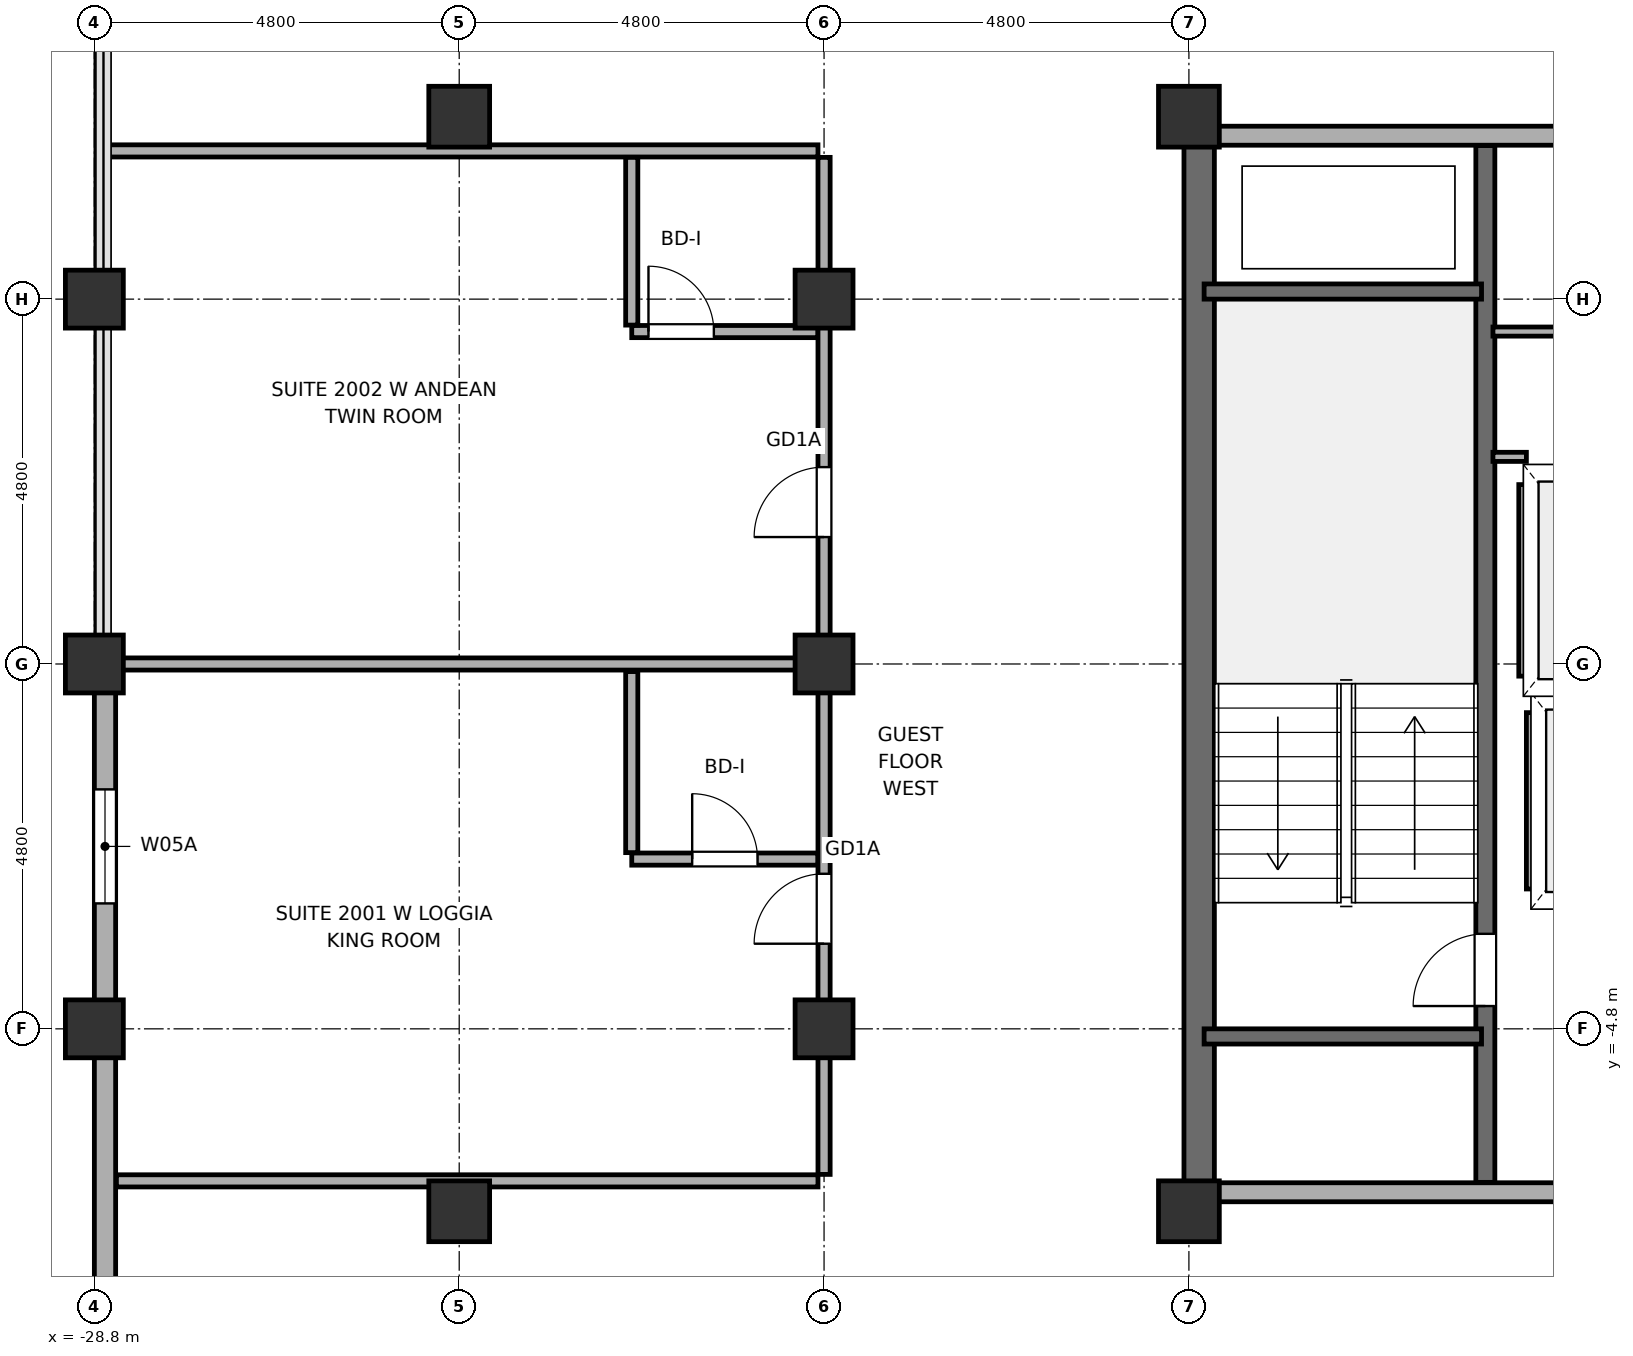
"""IFC4 building model, lengths in metres.
Left out: names, types, materials, properties, quantities, classifications, styles, units other than length and angle.
Written with IfcOpenShell. Run it as: python <this file> out.ifc"""

import sys

from ifc_helpers import new_model, si_unit, direction, frame, frame_2d, origin, origin_2d, place, context, subcontext, project, spatial, rectangle, hollow_rectangle, hollow_circle, extrude, element, fill, save


model = new_model("IFC4")
c1 = context("Model", 3, precision=1e-05, world=origin(), true_north=direction((0.0, 1.0)))
c2 = subcontext(c1, "Body", "Model", "MODEL_VIEW")
j1 = project(units=[si_unit("LENGTHUNIT", "METRE"), si_unit("PLANEANGLEUNIT", "RADIAN")], contexts=[c1])
p1 = place(None, origin())
s1 = spatial("IfcSite", under=j1, at=p1, CompositionType="ELEMENT")
p2 = place(p1, origin())
s2 = spatial("IfcBuilding", under=s1, at=p2, CompositionType="ELEMENT")
p3 = place(p2, frame((0.0, 0.0, 85.5)))
s3 = spatial("IfcBuildingStorey", under=s2, at=p3, CompositionType="ELEMENT", Elevation=85.5)
for number, where, z_axis, x_axis in (
    (1, (-28.8, -4.8, 0.0), (0.0, 0.0, 1.0), (1.0, 0.0, 0.0)),
    (2, (-28.8, 0.0, 0.0), (0.0, 0.0, 1.0), (1.0, 0.0, 0.0)),
    (3, (-28.8, 4.8, 0.0), (0.0, 0.0, 1.0), (1.0, 0.0, 0.0)),
):
    element("IfcColumn", number, at=place(p3, frame(where, z_axis=z_axis, x_axis=x_axis)), inside=s3, PredefinedType="COLUMN", context=c2, shape_type="SweptSolid", body=[
        extrude(hollow_circle(Radius=0.381, WallThickness=0.032, at=origin_2d()), origin(), (0.0, 0.0, 1.0), 3.7),
    ])
for number, where, z_axis, x_axis in (
    (4, (-24.0, -7.2, 0.0), (0.0, 0.0, 1.0), (1.0, 0.0, 0.0)),
    (5, (-24.0, 7.2, 0.0), (0.0, 0.0, 1.0), (1.0, 0.0, 0.0)),
):
    element("IfcColumn", number, at=place(p3, frame(where, z_axis=z_axis, x_axis=x_axis)), inside=s3, PredefinedType="COLUMN", context=c2, shape_type="SweptSolid", body=[
        extrude(hollow_rectangle(XDim=0.8, YDim=0.8, WallThickness=0.036, at=origin_2d()), origin(), (0.0, 0.0, 1.0), 3.7),
    ])
for number, where, z_axis, x_axis in (
    (6, (-19.2, -4.8, 0.0), (0.0, 0.0, 1.0), (1.0, 0.0, 0.0)),
    (7, (-19.2, 0.0, 0.0), (0.0, 0.0, 1.0), (1.0, 0.0, 0.0)),
    (8, (-19.2, 4.8, 0.0), (0.0, 0.0, 1.0), (1.0, 0.0, 0.0)),
):
    element("IfcColumn", number, at=place(p3, frame(where, z_axis=z_axis, x_axis=x_axis)), inside=s3, PredefinedType="COLUMN", context=c2, shape_type="SweptSolid", body=[
        extrude(hollow_circle(Radius=0.381, WallThickness=0.032, at=origin_2d()), origin(), (0.0, 0.0, 1.0), 3.7),
    ])
for number, where, z_axis, x_axis in (
    (9, (-14.4, -7.2, 0.0), (0.0, 0.0, 1.0), (1.0, 0.0, 0.0)),
    (10, (-14.4, 7.2, 0.0), (0.0, 0.0, 1.0), (1.0, 0.0, 0.0)),
):
    element("IfcColumn", number, at=place(p3, frame(where, z_axis=z_axis, x_axis=x_axis)), inside=s3, PredefinedType="COLUMN", context=c2, shape_type="SweptSolid", body=[
        extrude(hollow_rectangle(XDim=0.8, YDim=0.8, WallThickness=0.036, at=origin_2d()), origin(), (0.0, 0.0, 1.0), 3.7),
    ])
p4 = place(p3, frame((-14.265, -7.2, -0.18), z_axis=(0.0, 0.0, 1.0), x_axis=(0.0, 1.0, 0.0)))
e11 = element("IfcWall", 11, at=p4, inside=s3, PredefinedType="SHEAR", context=c2, shape_type="SweptSolid", body=[
    extrude(rectangle(XDim=14.4, YDim=0.4, at=frame_2d((7.2, 0.0))), origin(), (0.0, 0.0, 1.0), 3.63),
])
p5 = place(p3, frame((-28.66, -20.4, 0.0), z_axis=(0.0, 0.0, 1.0), x_axis=(0.0, 1.0, 0.0)))
e12 = element("IfcWall", 12, at=p5, inside=s3, PredefinedType="SOLIDWALL", context=c2, shape_type="SweptSolid", body=[
    extrude(rectangle(XDim=20.38, YDim=0.28, at=frame_2d((10.19, 0.0))), origin(), (0.0, 0.0, 1.0), 2.05),
])
p6 = place(p5, frame((17.25, 0.0, 0.75)))
e13 = element("IfcOpeningElement", 13, at=p6, cuts=e12, PredefinedType="OPENING", context=c2, shape_type="SweptSolid", body=[
    extrude(rectangle(XDim=1.5, YDim=1.15, at=frame_2d((0.75, 0.575))), frame((0.0, 0.155, 0.0), z_axis=(0.0, -1.0, 0.0), x_axis=(1.0, 0.0, 0.0)), (0.0, 0.0, 1.0), 0.31),
])
p7 = place(p3, frame((-14.2, -6.95, 0.0), z_axis=(0.0, 0.0, 1.0), x_axis=(1.0, 0.0, 0.0)))
e14 = element("IfcWall", 14, at=p7, inside=s3, PredefinedType="SOLIDWALL", context=c2, shape_type="SweptSolid", body=[
    extrude(rectangle(XDim=9.4, YDim=0.25, at=frame_2d((4.7, 0.0))), origin(), (0.0, 0.0, 1.0), 2.05),
])
p8 = place(p7, frame((4.9, 0.0, 0.0)))
e15 = element("IfcOpeningElement", 15, at=p8, cuts=e14, PredefinedType="OPENING", context=c2, shape_type="SweptSolid", body=[
    extrude(rectangle(XDim=1.0, YDim=2.02, at=frame_2d((0.5, 1.01))), frame((0.0, 0.14, 0.0), z_axis=(0.0, -1.0, 0.0), x_axis=(1.0, 0.0, 0.0)), (0.0, 0.0, 1.0), 0.28),
])
p9 = place(p3, frame((-14.2, 6.95, 0.0), z_axis=(0.0, 0.0, 1.0), x_axis=(1.0, 0.0, 0.0)))
e16 = element("IfcWall", 16, at=p9, inside=s3, PredefinedType="SOLIDWALL", context=c2, shape_type="SweptSolid", body=[
    extrude(rectangle(XDim=9.4, YDim=0.25, at=frame_2d((4.7, 0.0))), origin(), (0.0, 0.0, 1.0), 2.05),
])
p10 = place(p9, frame((4.9, 0.0, 0.0)))
e17 = element("IfcOpeningElement", 17, at=p10, cuts=e16, PredefinedType="OPENING", context=c2, shape_type="SweptSolid", body=[
    extrude(rectangle(XDim=1.0, YDim=2.02, at=frame_2d((0.5, 1.01))), frame((0.0, 0.14, 0.0), z_axis=(0.0, -1.0, 0.0), x_axis=(1.0, 0.0, 0.0)), (0.0, 0.0, 1.0), 0.28),
])
p11 = place(p3, frame((-10.5, -6.82, -0.18), z_axis=(0.0, 0.0, 1.0), x_axis=(0.0, 1.0, 0.0)))
e18 = element("IfcWall", 18, at=p11, inside=s3, PredefinedType="SOLIDWALL", context=c2, shape_type="SweptSolid", body=[
    extrude(rectangle(XDim=13.64, YDim=0.25, at=frame_2d((6.82, 0.0))), origin(), (0.0, 0.0, 1.0), 3.63),
])
p12 = place(p11, frame((2.32, 0.0, 0.18)))
e19 = element("IfcOpeningElement", 19, at=p12, cuts=e18, PredefinedType="OPENING", context=c2, shape_type="SweptSolid", body=[
    extrude(rectangle(XDim=0.95, YDim=2.15, at=frame_2d((0.475, 1.075))), frame((0.0, 0.14, 0.0), z_axis=(0.0, -1.0, 0.0), x_axis=(1.0, 0.0, 0.0)), (0.0, 0.0, 1.0), 0.28),
])
for number, where, z_axis, x_axis in (
    (20, (-14.2, -4.9, -0.18), (0.0, 0.0, 1.0), (1.0, 0.0, 0.0)),
    (21, (-14.2, 4.9, -0.18), (0.0, 0.0, 1.0), (1.0, 0.0, 0.0)),
):
    element("IfcWall", number, at=place(p3, frame(where, z_axis=z_axis, x_axis=x_axis)), inside=s3, PredefinedType="SOLIDWALL", context=c2, shape_type="SweptSolid", body=[
        extrude(rectangle(XDim=3.65, YDim=0.2, at=frame_2d((1.825, 0.0))), origin(), (0.0, 0.0, 1.0), 3.63),
    ])
p13 = place(p3, frame((-9.82, -3.1, 0.0), z_axis=(0.0, 0.0, 1.0), x_axis=(1.0, 0.0, 0.0)))
e22 = element("IfcWall", 22, at=p13, inside=s3, PredefinedType="SOLIDWALL", context=c2, shape_type="SweptSolid", body=[
    extrude(rectangle(XDim=2.04, YDim=0.2, at=frame_2d((1.02, 0.0))), origin(), (0.0, 0.0, 1.0), 3.45),
])
p14 = place(p13, frame((0.47, 0.0, 0.0)))
e23 = element("IfcOpeningElement", 23, at=p14, cuts=e22, PredefinedType="OPENING", context=c2, shape_type="SweptSolid", body=[
    extrude(rectangle(XDim=1.1, YDim=2.2, at=frame_2d((0.55, 1.1))), frame((0.0, 0.115, 0.0), z_axis=(0.0, -1.0, 0.0), x_axis=(1.0, 0.0, 0.0)), (0.0, 0.0, 1.0), 0.23),
])
p15 = place(p3, frame((-9.82, -0.5, 0.0), z_axis=(0.0, 0.0, 1.0), x_axis=(1.0, 0.0, 0.0)))
e24 = element("IfcWall", 24, at=p15, inside=s3, PredefinedType="SOLIDWALL", context=c2, shape_type="SweptSolid", body=[
    extrude(rectangle(XDim=2.04, YDim=0.2, at=frame_2d((1.02, 0.0))), origin(), (0.0, 0.0, 1.0), 3.45),
])
p16 = place(p3, frame((-9.9, -2.96, 0.0), z_axis=(0.0, 0.0, 1.0), x_axis=(0.0, 1.0, 0.0)))
e25 = element("IfcWall", 25, at=p16, inside=s3, PredefinedType="PARTITIONING", context=c2, shape_type="SweptSolid", body=[
    extrude(rectangle(XDim=2.32, YDim=0.12, at=frame_2d((1.16, 0.0))), origin(), (0.0, 0.0, 1.0), 3.45),
])
p17 = place(p3, frame((-9.92, 2.5, 0.0), z_axis=(0.0, 0.0, 1.0), x_axis=(1.0, 0.0, 0.0)))
e26 = element("IfcWall", 26, at=p17, inside=s3, PredefinedType="SOLIDWALL", context=c2, shape_type="SweptSolid", body=[
    extrude(rectangle(XDim=2.24, YDim=0.2, at=frame_2d((1.12, 0.0))), origin(), (0.0, 0.0, 1.0), 3.45),
])
p18 = place(p17, frame((0.495, 0.0, 0.0)))
e27 = element("IfcOpeningElement", 27, at=p18, cuts=e26, PredefinedType="OPENING", context=c2, shape_type="SweptSolid", body=[
    extrude(rectangle(XDim=1.25, YDim=2.25, at=frame_2d((0.625, 1.125))), frame((0.0, 0.115, 0.0), z_axis=(0.0, -1.0, 0.0), x_axis=(1.0, 0.0, 0.0)), (0.0, 0.0, 1.0), 0.23),
])
p19 = place(p3, frame((-9.92, -0.3, 0.0), z_axis=(0.0, 0.0, 1.0), x_axis=(1.0, 0.0, 0.0)))
e28 = element("IfcWall", 28, at=p19, inside=s3, PredefinedType="SOLIDWALL", context=c2, shape_type="SweptSolid", body=[
    extrude(rectangle(XDim=2.24, YDim=0.2, at=frame_2d((1.12, 0.0))), origin(), (0.0, 0.0, 1.0), 3.45),
])
p20 = place(p3, frame((-10.0, -0.16, 0.0), z_axis=(0.0, 0.0, 1.0), x_axis=(0.0, 1.0, 0.0)))
e29 = element("IfcWall", 29, at=p20, inside=s3, PredefinedType="PARTITIONING", context=c2, shape_type="SweptSolid", body=[
    extrude(rectangle(XDim=2.52, YDim=0.12, at=frame_2d((1.26, 0.0))), origin(), (0.0, 0.0, 1.0), 3.45),
])
p21 = place(p3, frame((-28.51, -6.8, 0.0), z_axis=(0.0, 0.0, 1.0), x_axis=(1.0, 0.0, 0.0)))
e30 = element("IfcWall", 30, at=p21, inside=s3, PredefinedType="PARTITIONING", context=c2, shape_type="SweptSolid", body=[
    extrude(rectangle(XDim=9.23, YDim=0.16, at=frame_2d((4.615, 0.0))), origin(), (0.0, 0.0, 1.0), 2.05),
])
p22 = place(p3, frame((-21.73, -2.567, 0.0), z_axis=(0.0, 0.0, 1.0), x_axis=(1.0, 0.0, 0.0)))
e31 = element("IfcWall", 31, at=p22, inside=s3, PredefinedType="PARTITIONING", context=c2, shape_type="SweptSolid", body=[
    extrude(rectangle(XDim=2.45, YDim=0.16, at=frame_2d((1.225, 0.0))), origin(), (0.0, 0.0, 1.0), 2.75),
])
p23 = place(p22, frame((0.795, 0.0, 0.0)))
e32 = element("IfcOpeningElement", 32, at=p23, cuts=e31, PredefinedType="OPENING", context=c2, shape_type="SweptSolid", body=[
    extrude(rectangle(XDim=0.86, YDim=2.1, at=frame_2d((0.43, 1.05))), frame((0.0, 0.095, 0.0), z_axis=(0.0, -1.0, 0.0), x_axis=(1.0, 0.0, 0.0)), (0.0, 0.0, 1.0), 0.19),
])
p24 = place(p3, frame((-28.63, 0.0, 0.0), z_axis=(0.0, 0.0, 1.0), x_axis=(1.0, 0.0, 0.0)))
e33 = element("IfcWall", 33, at=p24, inside=s3, PredefinedType="PARTITIONING", context=c2, shape_type="SweptSolid", body=[
    extrude(rectangle(XDim=9.35, YDim=0.16, at=frame_2d((4.675, 0.0))), origin(), (0.0, 0.0, 1.0), 2.75),
])
p25 = place(p3, frame((-10.4, 2.725, 0.0), z_axis=(0.0, 0.0, 1.0), x_axis=(1.0, 0.0, 0.0)))
e34 = element("IfcWall", 34, at=p25, inside=s3, PredefinedType="PARTITIONING", context=c2, shape_type="SweptSolid", body=[
    extrude(rectangle(XDim=0.44, YDim=0.12, at=frame_2d((0.22, 0.0))), origin(), (0.0, 0.0, 1.0), 3.45),
])
p26 = place(p3, frame((-21.73, 4.373, 0.0), z_axis=(0.0, 0.0, 1.0), x_axis=(1.0, 0.0, 0.0)))
e35 = element("IfcWall", 35, at=p26, inside=s3, PredefinedType="PARTITIONING", context=c2, shape_type="SweptSolid", body=[
    extrude(rectangle(XDim=2.45, YDim=0.16, at=frame_2d((1.225, 0.0))), origin(), (0.0, 0.0, 1.0), 2.75),
])
p27 = place(p26, frame((0.22, 0.0, 0.0)))
e36 = element("IfcOpeningElement", 36, at=p27, cuts=e35, PredefinedType="OPENING", context=c2, shape_type="SweptSolid", body=[
    extrude(rectangle(XDim=0.86, YDim=2.1, at=frame_2d((0.43, 1.05))), frame((0.0, 0.095, 0.0), z_axis=(0.0, -1.0, 0.0), x_axis=(1.0, 0.0, 0.0)), (0.0, 0.0, 1.0), 0.19),
])
p28 = place(p3, frame((-10.4, 4.373, 0.0), z_axis=(0.0, 0.0, 1.0), x_axis=(1.0, 0.0, 0.0)))
e37 = element("IfcWall", 37, at=p28, inside=s3, PredefinedType="PARTITIONING", context=c2, shape_type="SweptSolid", body=[
    extrude(rectangle(XDim=3.2, YDim=0.12, at=frame_2d((1.6, 0.0))), origin(), (0.0, 0.0, 1.0), 3.45),
])
p29 = place(p28, frame((1.15, 0.0, 0.0)))
e38 = element("IfcOpeningElement", 38, at=p29, cuts=e37, PredefinedType="OPENING", context=c2, shape_type="SweptSolid", body=[
    extrude(rectangle(XDim=0.9, YDim=2.1, at=frame_2d((0.45, 1.05))), frame((0.0, 0.075, 0.0), z_axis=(0.0, -1.0, 0.0), x_axis=(1.0, 0.0, 0.0)), (0.0, 0.0, 1.0), 0.15),
])
p30 = place(p3, frame((-28.63, 6.75, 0.0), z_axis=(0.0, 0.0, 1.0), x_axis=(1.0, 0.0, 0.0)))
e39 = element("IfcWall", 39, at=p30, inside=s3, PredefinedType="PARTITIONING", context=c2, shape_type="SweptSolid", body=[
    extrude(rectangle(XDim=9.35, YDim=0.16, at=frame_2d((4.675, 0.0))), origin(), (0.0, 0.0, 1.0), 2.05),
])
p31 = place(p3, frame((-21.73, -2.482, 0.0), z_axis=(0.0, 0.0, 1.0), x_axis=(0.0, 1.0, 0.0)))
e40 = element("IfcWall", 40, at=p31, inside=s3, PredefinedType="PARTITIONING", context=c2, shape_type="SweptSolid", body=[
    extrude(rectangle(XDim=2.382, YDim=0.16, at=frame_2d((1.191, 0.0))), origin(), (0.0, 0.0, 1.0), 3.45),
])
p32 = place(p3, frame((-21.73, 4.458, 0.0), z_axis=(0.0, 0.0, 1.0), x_axis=(0.0, 1.0, 0.0)))
e41 = element("IfcWall", 41, at=p32, inside=s3, PredefinedType="PARTITIONING", context=c2, shape_type="SweptSolid", body=[
    extrude(rectangle(XDim=2.207, YDim=0.16, at=frame_2d((1.104, 0.0))), origin(), (0.0, 0.0, 1.0), 3.45),
])
p33 = place(p3, frame((-19.2, -6.715, 0.0), z_axis=(0.0, 0.0, 1.0), x_axis=(0.0, 1.0, 0.0)))
e42 = element("IfcWall", 42, at=p33, inside=s3, PredefinedType="PARTITIONING", context=c2, shape_type="SweptSolid", body=[
    extrude(rectangle(XDim=13.38, YDim=0.16, at=frame_2d((6.69, 0.0))), origin(), (0.0, 0.0, 1.0), 2.05),
])
p34 = place(p33, frame((3.035, 0.0, 0.0)))
e43 = element("IfcOpeningElement", 43, at=p34, cuts=e42, PredefinedType="OPENING", context=c2, shape_type="SweptSolid", body=[
    extrude(rectangle(XDim=0.92, YDim=2.02, at=frame_2d((0.46, 1.01))), frame((0.0, 0.095, 0.0), z_axis=(0.0, -1.0, 0.0), x_axis=(1.0, 0.0, 0.0)), (0.0, 0.0, 1.0), 0.19),
])
p35 = place(p33, frame((8.385, 0.0, 0.0)))
e44 = element("IfcOpeningElement", 44, at=p35, cuts=e42, PredefinedType="OPENING", context=c2, shape_type="SweptSolid", body=[
    extrude(rectangle(XDim=0.92, YDim=2.02, at=frame_2d((0.46, 1.01))), frame((0.0, 0.095, 0.0), z_axis=(0.0, -1.0, 0.0), x_axis=(1.0, 0.0, 0.0)), (0.0, 0.0, 1.0), 0.19),
])
p36 = place(p6, origin())
e45 = element("IfcWindow", 45, at=p36, inside=s3, PartitioningType="SINGLE_PANEL", PredefinedType="WINDOW", context=c2, shape_type="SweptSolid", body=[
    extrude(rectangle(XDim=1.5, YDim=1.15, at=frame_2d((0.75, 0.575))), frame((0.0, 0.03, 0.0), z_axis=(0.0, -1.0, 0.0), x_axis=(1.0, 0.0, 0.0)), (0.0, 0.0, 1.0), 0.06),
])
fill(e13, e45)
p37 = place(p12, origin())
e46 = element("IfcDoor", 46, at=p37, inside=s3, OperationType="SINGLE_SWING_RIGHT", PredefinedType="DOOR", context=c2, shape_type="SweptSolid", body=[
    extrude(rectangle(XDim=0.95, YDim=2.15, at=frame_2d((0.475, 1.075))), frame((0.0, 0.025, 0.0), z_axis=(0.0, -1.0, 0.0), x_axis=(1.0, 0.0, 0.0)), (0.0, 0.0, 1.0), 0.05),
])
fill(e19, e46)
p38 = place(p34, origin())
e47 = element("IfcDoor", 47, at=p38, inside=s3, OperationType="SINGLE_SWING_RIGHT", PredefinedType="DOOR", context=c2, shape_type="SweptSolid", body=[
    extrude(rectangle(XDim=0.92, YDim=2.02, at=frame_2d((0.46, 1.01))), frame((0.0, 0.025, 0.0), z_axis=(0.0, -1.0, 0.0), x_axis=(1.0, 0.0, 0.0)), (0.0, 0.0, 1.0), 0.05),
])
fill(e43, e47)
p39 = place(p23, origin())
e48 = element("IfcDoor", 48, at=p39, inside=s3, OperationType="SINGLE_SWING_RIGHT", PredefinedType="DOOR", context=c2, shape_type="SweptSolid", body=[
    extrude(rectangle(XDim=0.86, YDim=2.1, at=frame_2d((0.43, 1.05))), frame((0.0, 0.025, 0.0), z_axis=(0.0, -1.0, 0.0), x_axis=(1.0, 0.0, 0.0)), (0.0, 0.0, 1.0), 0.05),
])
fill(e32, e48)
p40 = place(p35, origin())
e49 = element("IfcDoor", 49, at=p40, inside=s3, OperationType="SINGLE_SWING_LEFT", PredefinedType="DOOR", context=c2, shape_type="SweptSolid", body=[
    extrude(rectangle(XDim=0.92, YDim=2.02, at=frame_2d((0.46, 1.01))), frame((0.0, 0.025, 0.0), z_axis=(0.0, -1.0, 0.0), x_axis=(1.0, 0.0, 0.0)), (0.0, 0.0, 1.0), 0.05),
])
fill(e44, e49)
p41 = place(p27, origin())
e50 = element("IfcDoor", 50, at=p41, inside=s3, OperationType="SINGLE_SWING_RIGHT", PredefinedType="DOOR", context=c2, shape_type="SweptSolid", body=[
    extrude(rectangle(XDim=0.86, YDim=2.1, at=frame_2d((0.43, 1.05))), frame((0.0, 0.025, 0.0), z_axis=(0.0, -1.0, 0.0), x_axis=(1.0, 0.0, 0.0)), (0.0, 0.0, 1.0), 0.05),
])
fill(e36, e50)
save(model, sys.argv[1])
